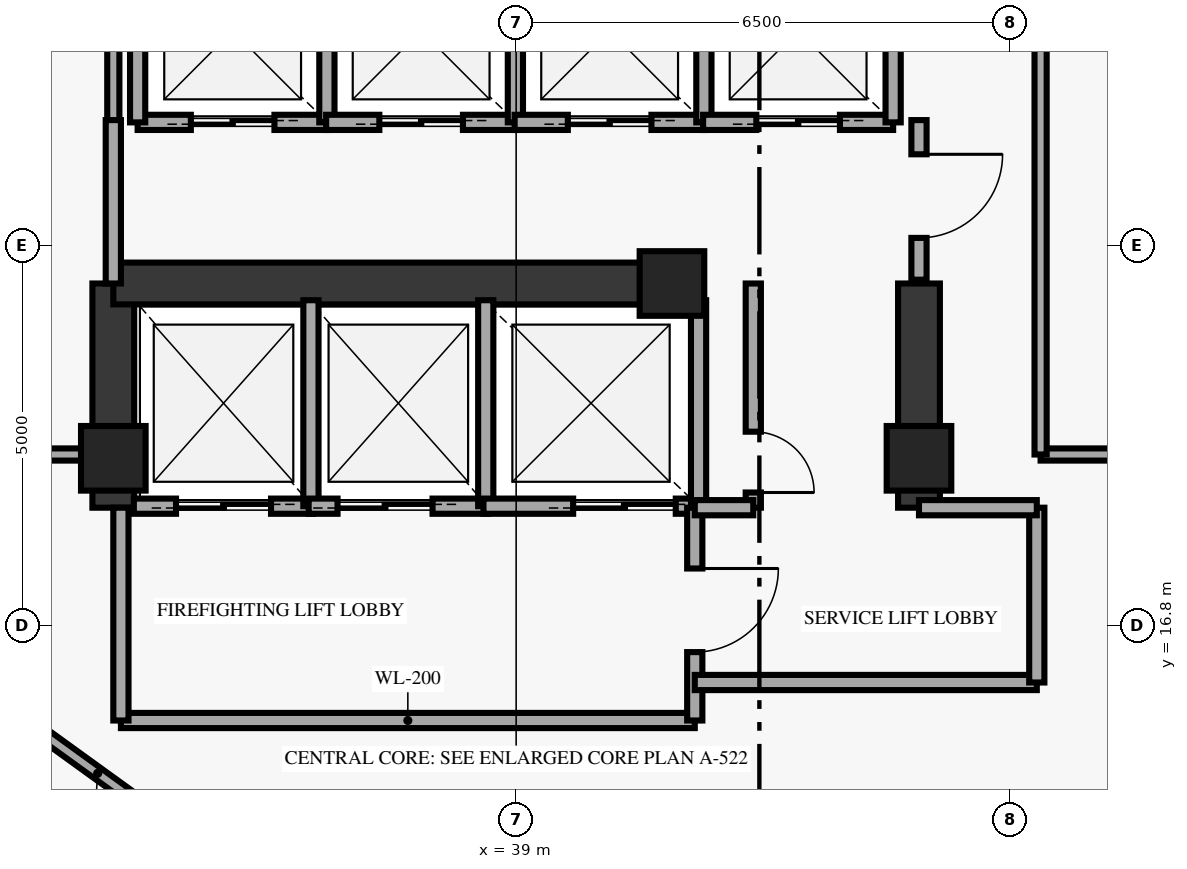
"""IFC4 building model, lengths in metres.
Left out: names, types, materials, properties, quantities, classifications, styles, units other than length and angle.
Written with IfcOpenShell. Run it as: python <this file> out.ifc"""

import sys

from ifc_helpers import new_model, si_unit, direction, frame, frame_2d, origin, origin_2d, place, context, subcontext, project, spatial, rectangle, extrude, element, fill, save


model = new_model("IFC4")
c1 = context("Model", 3, precision=1e-05, world=origin(), true_north=direction((0.0, 1.0)))
c2 = subcontext(c1, "Body", "Model", "MODEL_VIEW")
j1 = project(units=[si_unit("LENGTHUNIT", "METRE"), si_unit("PLANEANGLEUNIT", "RADIAN")], contexts=[c1])
p1 = place(None, origin())
s1 = spatial("IfcSite", under=j1, at=p1, CompositionType="ELEMENT")
p2 = place(p1, origin())
s2 = spatial("IfcBuilding", under=s1, at=p2, CompositionType="ELEMENT")
p3 = place(p2, frame((0.0, 0.0, 251.95)))
s3 = spatial("IfcBuildingStorey", under=s2, at=p3, CompositionType="ELEMENT", Elevation=251.95)
for number, where, z_axis, x_axis in (
    (1, (33.7, 19.0, 0.0), (0.0, 0.0, 1.0), (1.0, 0.0, 0.0)),
    (2, (41.05, 21.3, 0.0), (0.0, 0.0, 1.0), (1.0, 0.0, 0.0)),
    (3, (44.3, 19.0, 0.0), (0.0, 0.0, 1.0), (1.0, 0.0, 0.0)),
):
    element("IfcColumn", number, at=place(p3, frame(where, z_axis=z_axis, x_axis=x_axis)), inside=s3, PredefinedType="PILASTER", context=c2, shape_type="SweptSolid", body=[
        extrude(rectangle(XDim=0.85, YDim=0.85, at=origin_2d()), origin(), (0.0, 0.0, 1.0), 3.39),
    ])
for number, where, z_axis, x_axis in (
    (4, (33.7, 18.35, 0.0), (0.0, 0.0, 1.0), (0.0, 1.0, 0.0)),
    (5, (44.3, 18.35, 0.0), (0.0, 0.0, 1.0), (0.0, 1.0, 0.0)),
):
    element("IfcWall", number, at=place(p3, frame(where, z_axis=z_axis, x_axis=x_axis)), inside=s3, PredefinedType="SHEAR", context=c2, shape_type="SweptSolid", body=[
        extrude(rectangle(XDim=2.95, YDim=0.55, at=frame_2d((1.475, 0.0))), origin(), (0.0, 0.0, 1.0), 3.39),
    ])
p4 = place(p3, frame((33.7, 21.3, 0.0), z_axis=(0.0, 0.0, 1.0), x_axis=(1.0, 0.0, 0.0)))
e6 = element("IfcWall", 6, at=p4, inside=s3, PredefinedType="SHEAR", context=c2, shape_type="SweptSolid", body=[
    extrude(rectangle(XDim=7.55, YDim=0.55, at=frame_2d((3.775, 0.0))), origin(), (0.0, 0.0, 1.0), 3.39),
])
p5 = place(p3, frame((34.02, 23.42, 0.0), z_axis=(0.0, 0.0, 1.0), x_axis=(1.0, 0.0, 0.0)))
e7 = element("IfcWall", 7, at=p5, inside=s3, PredefinedType="SOLIDWALL", context=c2, shape_type="SweptSolid", body=[
    extrude(rectangle(XDim=2.5, YDim=0.2, at=frame_2d((1.25, 0.0))), origin(), (0.0, 0.0, 1.0), 3.39),
])
p6 = place(p5, frame((0.7, 0.0, 0.0)))
e8 = element("IfcOpeningElement", 8, at=p6, cuts=e7, PredefinedType="OPENING", context=c2, shape_type="SweptSolid", body=[
    extrude(rectangle(XDim=1.1, YDim=2.15, at=frame_2d((0.55, 1.075))), frame((0.0, 0.11, 0.0), z_axis=(0.0, -1.0, 0.0), x_axis=(1.0, 0.0, 0.0)), (0.0, 0.0, 1.0), 0.22),
])
for number, where, z_axis, x_axis in (
    (9, (34.02, 23.42, 0.0), (0.0, 0.0, 1.0), (0.0, 1.0, 0.0)),
    (10, (36.51, 23.42, 0.0), (0.0, 0.0, 1.0), (0.0, 1.0, 0.0)),
):
    element("IfcWall", number, at=place(p3, frame(where, z_axis=z_axis, x_axis=x_axis)), inside=s3, PredefinedType="SOLIDWALL", context=c2, shape_type="SweptSolid", body=[
        extrude(rectangle(XDim=2.41, YDim=0.2, at=frame_2d((1.205, 0.0))), origin(), (0.0, 0.0, 1.0), 3.39),
    ])
p7 = place(p3, frame((36.5, 23.42, 0.0), z_axis=(0.0, 0.0, 1.0), x_axis=(1.0, 0.0, 0.0)))
e11 = element("IfcWall", 11, at=p7, inside=s3, PredefinedType="SOLIDWALL", context=c2, shape_type="SweptSolid", body=[
    extrude(rectangle(XDim=2.5, YDim=0.2, at=frame_2d((1.25, 0.0))), origin(), (0.0, 0.0, 1.0), 3.39),
])
p8 = place(p7, frame((0.7, 0.0, 0.0)))
e12 = element("IfcOpeningElement", 12, at=p8, cuts=e11, PredefinedType="OPENING", context=c2, shape_type="SweptSolid", body=[
    extrude(rectangle(XDim=1.1, YDim=2.15, at=frame_2d((0.55, 1.075))), frame((0.0, 0.11, 0.0), z_axis=(0.0, -1.0, 0.0), x_axis=(1.0, 0.0, 0.0)), (0.0, 0.0, 1.0), 0.22),
])
p9 = place(p3, frame((38.99, 23.42, 0.0), z_axis=(0.0, 0.0, 1.0), x_axis=(0.0, 1.0, 0.0)))
e13 = element("IfcWall", 13, at=p9, inside=s3, PredefinedType="SOLIDWALL", context=c2, shape_type="SweptSolid", body=[
    extrude(rectangle(XDim=2.41, YDim=0.2, at=frame_2d((1.205, 0.0))), origin(), (0.0, 0.0, 1.0), 3.39),
])
p10 = place(p3, frame((38.98, 23.42, 0.0), z_axis=(0.0, 0.0, 1.0), x_axis=(1.0, 0.0, 0.0)))
e14 = element("IfcWall", 14, at=p10, inside=s3, PredefinedType="SOLIDWALL", context=c2, shape_type="SweptSolid", body=[
    extrude(rectangle(XDim=2.5, YDim=0.2, at=frame_2d((1.25, 0.0))), origin(), (0.0, 0.0, 1.0), 3.39),
])
p11 = place(p10, frame((0.7, 0.0, 0.0)))
e15 = element("IfcOpeningElement", 15, at=p11, cuts=e14, PredefinedType="OPENING", context=c2, shape_type="SweptSolid", body=[
    extrude(rectangle(XDim=1.1, YDim=2.15, at=frame_2d((0.55, 1.075))), frame((0.0, 0.11, 0.0), z_axis=(0.0, -1.0, 0.0), x_axis=(1.0, 0.0, 0.0)), (0.0, 0.0, 1.0), 0.22),
])
p12 = place(p3, frame((41.47, 23.42, 0.0), z_axis=(0.0, 0.0, 1.0), x_axis=(0.0, 1.0, 0.0)))
e16 = element("IfcWall", 16, at=p12, inside=s3, PredefinedType="SOLIDWALL", context=c2, shape_type="SweptSolid", body=[
    extrude(rectangle(XDim=2.41, YDim=0.2, at=frame_2d((1.205, 0.0))), origin(), (0.0, 0.0, 1.0), 3.39),
])
p13 = place(p3, frame((41.46, 23.42, 0.0), z_axis=(0.0, 0.0, 1.0), x_axis=(1.0, 0.0, 0.0)))
e17 = element("IfcWall", 17, at=p13, inside=s3, PredefinedType="SOLIDWALL", context=c2, shape_type="SweptSolid", body=[
    extrude(rectangle(XDim=2.5, YDim=0.2, at=frame_2d((1.25, 0.0))), origin(), (0.0, 0.0, 1.0), 3.39),
])
p14 = place(p13, frame((0.7, 0.0, 0.0)))
e18 = element("IfcOpeningElement", 18, at=p14, cuts=e17, PredefinedType="OPENING", context=c2, shape_type="SweptSolid", body=[
    extrude(rectangle(XDim=1.1, YDim=2.15, at=frame_2d((0.55, 1.075))), frame((0.0, 0.11, 0.0), z_axis=(0.0, -1.0, 0.0), x_axis=(1.0, 0.0, 0.0)), (0.0, 0.0, 1.0), 0.22),
])
p15 = place(p3, frame((43.96, 23.42, 0.0), z_axis=(0.0, 0.0, 1.0), x_axis=(0.0, 1.0, 0.0)))
e19 = element("IfcWall", 19, at=p15, inside=s3, PredefinedType="SOLIDWALL", context=c2, shape_type="SweptSolid", body=[
    extrude(rectangle(XDim=2.41, YDim=0.2, at=frame_2d((1.205, 0.0))), origin(), (0.0, 0.0, 1.0), 3.39),
])
p16 = place(p3, frame((33.97, 18.37, 0.0), z_axis=(0.0, 0.0, 1.0), x_axis=(1.0, 0.0, 0.0)))
e20 = element("IfcWall", 20, at=p16, inside=s3, PredefinedType="SOLIDWALL", context=c2, shape_type="SweptSolid", body=[
    extrude(rectangle(XDim=2.36, YDim=0.2, at=frame_2d((1.18, 0.0))), origin(), (0.0, 0.0, 1.0), 3.39),
])
p17 = place(p16, frame((0.555, 0.0, 0.0)))
e21 = element("IfcOpeningElement", 21, at=p17, cuts=e20, PredefinedType="OPENING", context=c2, shape_type="SweptSolid", body=[
    extrude(rectangle(XDim=1.25, YDim=2.2, at=frame_2d((0.625, 1.1))), frame((0.0, 0.11, 0.0), z_axis=(0.0, -1.0, 0.0), x_axis=(1.0, 0.0, 0.0)), (0.0, 0.0, 1.0), 0.22),
])
p18 = place(p3, frame((36.3, 18.37, 0.0), z_axis=(0.0, 0.0, 1.0), x_axis=(0.0, 1.0, 0.0)))
e22 = element("IfcWall", 22, at=p18, inside=s3, PredefinedType="SOLIDWALL", context=c2, shape_type="SweptSolid", body=[
    extrude(rectangle(XDim=2.71, YDim=0.2, at=frame_2d((1.355, 0.0))), origin(), (0.0, 0.0, 1.0), 3.39),
])
p19 = place(p3, frame((36.27, 18.37, 0.0), z_axis=(0.0, 0.0, 1.0), x_axis=(1.0, 0.0, 0.0)))
e23 = element("IfcWall", 23, at=p19, inside=s3, PredefinedType="SOLIDWALL", context=c2, shape_type="SweptSolid", body=[
    extrude(rectangle(XDim=2.36, YDim=0.2, at=frame_2d((1.18, 0.0))), origin(), (0.0, 0.0, 1.0), 3.39),
])
p20 = place(p19, frame((0.38, 0.0, 0.0)))
e24 = element("IfcOpeningElement", 24, at=p20, cuts=e23, PredefinedType="OPENING", context=c2, shape_type="SweptSolid", body=[
    extrude(rectangle(XDim=1.25, YDim=2.2, at=frame_2d((0.625, 1.1))), frame((0.0, 0.11, 0.0), z_axis=(0.0, -1.0, 0.0), x_axis=(1.0, 0.0, 0.0)), (0.0, 0.0, 1.0), 0.22),
])
p21 = place(p3, frame((38.6, 18.37, 0.0), z_axis=(0.0, 0.0, 1.0), x_axis=(0.0, 1.0, 0.0)))
e25 = element("IfcWall", 25, at=p21, inside=s3, PredefinedType="SOLIDWALL", context=c2, shape_type="SweptSolid", body=[
    extrude(rectangle(XDim=2.71, YDim=0.2, at=frame_2d((1.355, 0.0))), origin(), (0.0, 0.0, 1.0), 3.39),
])
p22 = place(p3, frame((38.57, 18.37, 0.0), z_axis=(0.0, 0.0, 1.0), x_axis=(1.0, 0.0, 0.0)))
e26 = element("IfcWall", 26, at=p22, inside=s3, PredefinedType="SOLIDWALL", context=c2, shape_type="SweptSolid", body=[
    extrude(rectangle(XDim=2.83, YDim=0.2, at=frame_2d((1.415, 0.0))), origin(), (0.0, 0.0, 1.0), 3.39),
])
p23 = place(p22, frame((1.18, 0.0, 0.0)))
e27 = element("IfcOpeningElement", 27, at=p23, cuts=e26, PredefinedType="OPENING", context=c2, shape_type="SweptSolid", body=[
    extrude(rectangle(XDim=1.35, YDim=2.02, at=frame_2d((0.675, 1.01))), frame((0.0, 0.11, 0.0), z_axis=(0.0, -1.0, 0.0), x_axis=(1.0, 0.0, 0.0)), (0.0, 0.0, 1.0), 0.22),
])
p24 = place(p3, frame((41.4, 18.37, 0.0), z_axis=(0.0, 0.0, 1.0), x_axis=(0.0, 1.0, 0.0)))
e28 = element("IfcWall", 28, at=p24, inside=s3, PredefinedType="SOLIDWALL", context=c2, shape_type="SweptSolid", body=[
    extrude(rectangle(XDim=2.71, YDim=0.2, at=frame_2d((1.355, 0.0))), origin(), (0.0, 0.0, 1.0), 3.39),
])
p25 = place(p3, frame((29.05, 19.05, 0.0), z_axis=(0.0, 0.0, 1.0), x_axis=(1.0, 0.0, 0.0)))
e29 = element("IfcWall", 29, at=p25, inside=s3, PredefinedType="PARTITIONING", context=c2, shape_type="SweptSolid", body=[
    extrude(rectangle(XDim=4.65, YDim=0.16, at=frame_2d((2.325, 0.0))), origin(), (0.0, 0.0, 1.0), 3.39),
])
p26 = place(p3, frame((33.7, 23.45, 0.0), z_axis=(0.0, 0.0, 1.0), x_axis=(0.0, 1.0, 0.0)))
e30 = element("IfcWall", 30, at=p26, inside=s3, PredefinedType="PARTITIONING", context=c2, shape_type="SweptSolid", body=[
    extrude(rectangle(XDim=2.67, YDim=0.16, at=frame_2d((1.335, 0.0))), origin(), (0.0, 0.0, 1.0), 2.775),
])
p27 = place(p3, frame((45.9, 19.05, 0.0), z_axis=(0.0, 0.0, 1.0), x_axis=(1.0, 0.0, 0.0)))
e31 = element("IfcWall", 31, at=p27, inside=s3, PredefinedType="PARTITIONING", context=c2, shape_type="SweptSolid", body=[
    extrude(rectangle(XDim=3.05, YDim=0.16, at=frame_2d((1.525, 0.0))), origin(), (0.0, 0.0, 1.0), 3.39),
])
p28 = place(p3, frame((45.9, 19.05, 0.0), z_axis=(0.0, 0.0, 1.0), x_axis=(0.0, 1.0, 0.0)))
e32 = element("IfcWall", 32, at=p28, inside=s3, PredefinedType="PARTITIONING", context=c2, shape_type="SweptSolid", body=[
    extrude(rectangle(XDim=7.07, YDim=0.16, at=frame_2d((3.535, 0.0))), origin(), (0.0, 0.0, 1.0), 3.39),
])
p29 = place(p3, frame((33.7, 21.3, 0.0), z_axis=(0.0, 0.0, 1.0), x_axis=(0.0, 1.0, 0.0)))
e33 = element("IfcWall", 33, at=p29, inside=s3, PredefinedType="SOLIDWALL", context=c2, shape_type="SweptSolid", body=[
    extrude(rectangle(XDim=2.15, YDim=0.2, at=frame_2d((1.075, 0.0))), origin(), (0.0, 0.0, 1.0), 2.775),
])
p30 = place(p3, frame((44.3, 21.35, 0.0), z_axis=(0.0, 0.0, 1.0), x_axis=(0.0, 1.0, 0.0)))
e34 = element("IfcWall", 34, at=p30, inside=s3, PredefinedType="SOLIDWALL", context=c2, shape_type="SweptSolid", body=[
    extrude(rectangle(XDim=2.1, YDim=0.2, at=frame_2d((1.05, 0.0))), origin(), (0.0, 0.0, 1.0), 2.775),
])
p31 = place(p30, frame((0.55, 0.0, 0.0)))
e35 = element("IfcOpeningElement", 35, at=p31, cuts=e34, PredefinedType="OPENING", context=c2, shape_type="SweptSolid", body=[
    extrude(rectangle(XDim=1.1, YDim=2.15, at=frame_2d((0.55, 1.075))), frame((0.0, 0.11, 0.0), z_axis=(0.0, -1.0, 0.0), x_axis=(1.0, 0.0, 0.0)), (0.0, 0.0, 1.0), 0.22),
])
p32 = place(p3, frame((33.8, 15.55, 0.0), z_axis=(0.0, 0.0, 1.0), x_axis=(1.0, 0.0, 0.0)))
e36 = element("IfcWall", 36, at=p32, inside=s3, PredefinedType="SOLIDWALL", context=c2, shape_type="SweptSolid", body=[
    extrude(rectangle(XDim=7.55, YDim=0.2, at=frame_2d((3.775, 0.0))), origin(), (0.0, 0.0, 1.0), 3.39),
])
p33 = place(p3, frame((33.8, 15.55, 0.0), z_axis=(0.0, 0.0, 1.0), x_axis=(0.0, 1.0, 0.0)))
e37 = element("IfcWall", 37, at=p33, inside=s3, PredefinedType="SOLIDWALL", context=c2, shape_type="SweptSolid", body=[
    extrude(rectangle(XDim=2.8, YDim=0.2, at=frame_2d((1.4, 0.0))), origin(), (0.0, 0.0, 1.0), 3.39),
])
p34 = place(p3, frame((41.35, 15.55, 0.0), z_axis=(0.0, 0.0, 1.0), x_axis=(0.0, 1.0, 0.0)))
e38 = element("IfcWall", 38, at=p34, inside=s3, PredefinedType="SOLIDWALL", context=c2, shape_type="SweptSolid", body=[
    extrude(rectangle(XDim=2.8, YDim=0.2, at=frame_2d((1.4, 0.0))), origin(), (0.0, 0.0, 1.0), 3.39),
])
p35 = place(p34, frame((0.9, 0.0, 0.0)))
e39 = element("IfcOpeningElement", 39, at=p35, cuts=e38, PredefinedType="OPENING", context=c2, shape_type="SweptSolid", body=[
    extrude(rectangle(XDim=1.1, YDim=2.15, at=frame_2d((0.55, 1.075))), frame((0.0, 0.11, 0.0), z_axis=(0.0, -1.0, 0.0), x_axis=(1.0, 0.0, 0.0)), (0.0, 0.0, 1.0), 0.22),
])
p36 = place(p3, frame((41.35, 16.05, 0.0), z_axis=(0.0, 0.0, 1.0), x_axis=(1.0, 0.0, 0.0)))
e40 = element("IfcWall", 40, at=p36, inside=s3, PredefinedType="SOLIDWALL", context=c2, shape_type="SweptSolid", body=[
    extrude(rectangle(XDim=4.5, YDim=0.2, at=frame_2d((2.25, 0.0))), origin(), (0.0, 0.0, 1.0), 3.39),
])
p37 = place(p3, frame((45.85, 16.05, 0.0), z_axis=(0.0, 0.0, 1.0), x_axis=(0.0, 1.0, 0.0)))
e41 = element("IfcWall", 41, at=p37, inside=s3, PredefinedType="SOLIDWALL", context=c2, shape_type="SweptSolid", body=[
    extrude(rectangle(XDim=2.3, YDim=0.2, at=frame_2d((1.15, 0.0))), origin(), (0.0, 0.0, 1.0), 3.39),
])
p38 = place(p3, frame((44.3, 18.35, 0.0), z_axis=(0.0, 0.0, 1.0), x_axis=(1.0, 0.0, 0.0)))
e42 = element("IfcWall", 42, at=p38, inside=s3, PredefinedType="SOLIDWALL", context=c2, shape_type="SweptSolid", body=[
    extrude(rectangle(XDim=1.55, YDim=0.2, at=frame_2d((0.775, 0.0))), origin(), (0.0, 0.0, 1.0), 3.39),
])
p39 = place(p3, frame((42.12, 18.35, 0.0), z_axis=(0.0, 0.0, 1.0), x_axis=(0.0, 1.0, 0.0)))
e43 = element("IfcWall", 43, at=p39, inside=s3, PredefinedType="SOLIDWALL", context=c2, shape_type="SweptSolid", body=[
    extrude(rectangle(XDim=2.95, YDim=0.2, at=frame_2d((1.475, 0.0))), origin(), (0.0, 0.0, 1.0), 3.39),
])
p40 = place(p39, frame((0.2, 0.0, 0.0)))
e44 = element("IfcOpeningElement", 44, at=p40, cuts=e43, PredefinedType="OPENING", context=c2, shape_type="SweptSolid", body=[
    extrude(rectangle(XDim=0.8, YDim=2.05, at=frame_2d((0.4, 1.025))), frame((0.0, 0.11, 0.0), z_axis=(0.0, -1.0, 0.0), x_axis=(1.0, 0.0, 0.0)), (0.0, 0.0, 1.0), 0.22),
])
p41 = place(p3, frame((41.35, 18.35, 0.0), z_axis=(0.0, 0.0, 1.0), x_axis=(1.0, 0.0, 0.0)))
e45 = element("IfcWall", 45, at=p41, inside=s3, PredefinedType="SOLIDWALL", context=c2, shape_type="SweptSolid", body=[
    extrude(rectangle(XDim=0.77, YDim=0.2, at=frame_2d((0.385, 0.0))), origin(), (0.0, 0.0, 1.0), 3.39),
])
p42 = place(p3, frame((45.865, 13.455, 0.0), z_axis=(0.0, 0.0, 1.0), x_axis=(0.75790014932, 0.652370572344, 0.0)))
e46 = element("IfcWall", 46, at=p42, inside=s3, PredefinedType="PARTITIONING", context=c2, shape_type="SweptSolid", body=[
    extrude(rectangle(XDim=3.752, YDim=0.16, at=frame_2d((1.876, 0.0))), origin(), (0.0, 0.0, 1.0), 3.39),
])
p43 = place(p3, frame((30.939, 16.703, 0.0), z_axis=(0.0, 0.0, 1.0), x_axis=(0.810290119061, -0.586028943784, 0.0)))
e47 = element("IfcWall", 47, at=p43, inside=s3, PredefinedType="PARTITIONING", context=c2, shape_type="SweptSolid", body=[
    extrude(rectangle(XDim=6.306, YDim=0.16, at=frame_2d((3.153, 0.0))), origin(), (0.0, 0.0, 1.0), 3.39),
])
p44 = place(p6, origin())
e48 = element("IfcDoor", 48, at=p44, inside=s3, OperationType="DOUBLE_DOOR_SLIDING", PredefinedType="DOOR", context=c2, shape_type="SweptSolid", body=[
    extrude(rectangle(XDim=1.1, YDim=2.15, at=frame_2d((0.55, 1.075))), frame((0.0, 0.025, 0.0), z_axis=(0.0, -1.0, 0.0), x_axis=(1.0, 0.0, 0.0)), (0.0, 0.0, 1.0), 0.05),
])
fill(e8, e48)
p45 = place(p8, origin())
e49 = element("IfcDoor", 49, at=p45, inside=s3, OperationType="DOUBLE_DOOR_SLIDING", PredefinedType="DOOR", context=c2, shape_type="SweptSolid", body=[
    extrude(rectangle(XDim=1.1, YDim=2.15, at=frame_2d((0.55, 1.075))), frame((0.0, 0.025, 0.0), z_axis=(0.0, -1.0, 0.0), x_axis=(1.0, 0.0, 0.0)), (0.0, 0.0, 1.0), 0.05),
])
fill(e12, e49)
p46 = place(p11, origin())
e50 = element("IfcDoor", 50, at=p46, inside=s3, OperationType="DOUBLE_DOOR_SLIDING", PredefinedType="DOOR", context=c2, shape_type="SweptSolid", body=[
    extrude(rectangle(XDim=1.1, YDim=2.15, at=frame_2d((0.55, 1.075))), frame((0.0, 0.025, 0.0), z_axis=(0.0, -1.0, 0.0), x_axis=(1.0, 0.0, 0.0)), (0.0, 0.0, 1.0), 0.05),
])
fill(e15, e50)
p47 = place(p14, origin())
e51 = element("IfcDoor", 51, at=p47, inside=s3, OperationType="DOUBLE_DOOR_SLIDING", PredefinedType="DOOR", context=c2, shape_type="SweptSolid", body=[
    extrude(rectangle(XDim=1.1, YDim=2.15, at=frame_2d((0.55, 1.075))), frame((0.0, 0.025, 0.0), z_axis=(0.0, -1.0, 0.0), x_axis=(1.0, 0.0, 0.0)), (0.0, 0.0, 1.0), 0.05),
])
fill(e18, e51)
p48 = place(p17, origin())
e52 = element("IfcDoor", 52, at=p48, inside=s3, OperationType="DOUBLE_DOOR_SLIDING", PredefinedType="DOOR", context=c2, shape_type="SweptSolid", body=[
    extrude(rectangle(XDim=1.25, YDim=2.2, at=frame_2d((0.625, 1.1))), frame((0.0, 0.025, 0.0), z_axis=(0.0, -1.0, 0.0), x_axis=(1.0, 0.0, 0.0)), (0.0, 0.0, 1.0), 0.05),
])
fill(e21, e52)
p49 = place(p20, origin())
e53 = element("IfcDoor", 53, at=p49, inside=s3, OperationType="DOUBLE_DOOR_SLIDING", PredefinedType="DOOR", context=c2, shape_type="SweptSolid", body=[
    extrude(rectangle(XDim=1.25, YDim=2.2, at=frame_2d((0.625, 1.1))), frame((0.0, 0.025, 0.0), z_axis=(0.0, -1.0, 0.0), x_axis=(1.0, 0.0, 0.0)), (0.0, 0.0, 1.0), 0.05),
])
fill(e24, e53)
p50 = place(p23, origin())
e54 = element("IfcDoor", 54, at=p50, inside=s3, OperationType="DOUBLE_DOOR_SLIDING", PredefinedType="DOOR", context=c2, shape_type="SweptSolid", body=[
    extrude(rectangle(XDim=1.35, YDim=2.02, at=frame_2d((0.675, 1.01))), frame((0.0, 0.025, 0.0), z_axis=(0.0, -1.0, 0.0), x_axis=(1.0, 0.0, 0.0)), (0.0, 0.0, 1.0), 0.05),
])
fill(e27, e54)
p51 = place(p31, origin())
e55 = element("IfcDoor", 55, at=p51, inside=s3, OperationType="SINGLE_SWING_RIGHT", PredefinedType="DOOR", context=c2, shape_type="SweptSolid", body=[
    extrude(rectangle(XDim=1.1, YDim=2.15, at=frame_2d((0.55, 1.075))), frame((0.0, 0.025, 0.0), z_axis=(0.0, -1.0, 0.0), x_axis=(1.0, 0.0, 0.0)), (0.0, 0.0, 1.0), 0.05),
])
fill(e35, e55)
p52 = place(p35, origin())
e56 = element("IfcDoor", 56, at=p52, inside=s3, OperationType="SINGLE_SWING_RIGHT", PredefinedType="DOOR", context=c2, shape_type="SweptSolid", body=[
    extrude(rectangle(XDim=1.1, YDim=2.15, at=frame_2d((0.55, 1.075))), frame((0.0, 0.025, 0.0), z_axis=(0.0, -1.0, 0.0), x_axis=(1.0, 0.0, 0.0)), (0.0, 0.0, 1.0), 0.05),
])
fill(e39, e56)
p53 = place(p40, origin())
e57 = element("IfcDoor", 57, at=p53, inside=s3, OperationType="SINGLE_SWING_LEFT", PredefinedType="DOOR", context=c2, shape_type="SweptSolid", body=[
    extrude(rectangle(XDim=0.8, YDim=2.05, at=frame_2d((0.4, 1.025))), frame((0.0, 0.025, 0.0), z_axis=(0.0, -1.0, 0.0), x_axis=(1.0, 0.0, 0.0)), (0.0, 0.0, 1.0), 0.05),
])
fill(e44, e57)
save(model, sys.argv[1])
